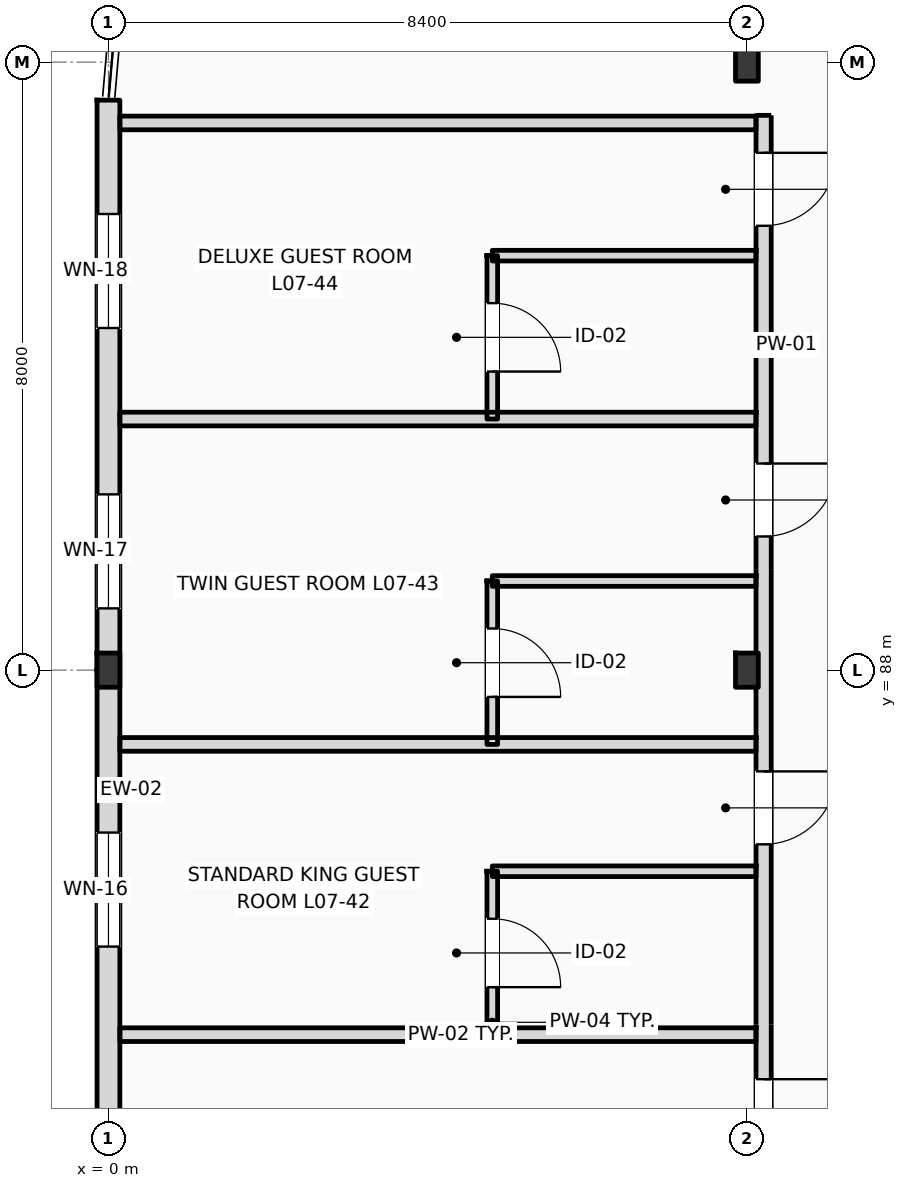
"""IFC4 building model, lengths in metres.
Left out: names, types, materials, properties, quantities, classifications, styles, units other than length and angle.
Written with IfcOpenShell. Run it as: python <this file> out.ifc"""

import sys

from ifc_helpers import new_model, si_unit, direction, frame, frame_2d, origin, origin_2d, place, context, subcontext, project, spatial, rectangle, i_section, extrude, element, fill, save


model = new_model("IFC4")
c1 = context("Model", 3, precision=1e-05, world=origin(), true_north=direction((0.0, 1.0)))
c2 = subcontext(c1, "Body", "Model", "MODEL_VIEW")
j1 = project(units=[si_unit("LENGTHUNIT", "METRE"), si_unit("PLANEANGLEUNIT", "RADIAN")], contexts=[c1])
p1 = place(None, origin())
s1 = spatial("IfcSite", under=j1, at=p1, CompositionType="ELEMENT")
p2 = place(p1, origin())
s2 = spatial("IfcBuilding", under=s1, at=p2, CompositionType="ELEMENT")
p3 = place(p2, frame((0.0, 0.0, 31.8)))
s3 = spatial("IfcBuildingStorey", under=s2, at=p3, CompositionType="ELEMENT", Elevation=31.8)
for number, where, z_axis, x_axis in (
    (1, (0.0, 88.0, 0.0), (0.0, 0.0, 1.0), (1.0, 0.0, 0.0)),
    (2, (8.4, 88.0, 0.0), (0.0, 0.0, 1.0), (1.0, 0.0, 0.0)),
):
    element("IfcColumn", number, at=place(p3, frame(where, z_axis=z_axis, x_axis=x_axis)), inside=s3, PredefinedType="COLUMN", context=c2, shape_type="SweptSolid", body=[
        extrude(i_section(OverallWidth=0.3, OverallDepth=0.45, WebThickness=0.014, FlangeThickness=0.026, FilletRadius=0.027, at=origin_2d()), origin(), (0.0, 0.0, 1.0), 3.6),
    ])
p4 = place(p3, frame((8.4, 96.0, 0.0), z_axis=(0.0, 0.0, 1.0), x_axis=(1.0, 0.0, 0.0)))
e3 = element("IfcColumn", 3, at=p4, inside=s3, PredefinedType="COLUMN", context=c2, shape_type="SweptSolid", body=[
    extrude(i_section(OverallWidth=0.3, OverallDepth=0.5, WebThickness=0.014, FlangeThickness=0.028, FilletRadius=0.027, at=origin_2d()), origin(), (0.0, 0.0, 1.0), 3.6),
])
p5 = place(p3, frame((0.0, 79.5, 0.0), z_axis=(0.0, 0.0, 1.0), x_axis=(0.0, 1.0, 0.0)))
e4 = element("IfcWall", 4, at=p5, inside=s3, PredefinedType="STANDARD", context=c2, shape_type="SweptSolid", body=[
    extrude(rectangle(XDim=8.5, YDim=0.3, at=frame_2d((4.25, 0.0))), origin(), (0.0, 0.0, 1.0), 2.99),
])
p6 = place(p5, frame((0.814, 0.0, 0.9)))
e5 = element("IfcOpeningElement", 5, at=p6, cuts=e4, PredefinedType="OPENING", context=c2, shape_type="SweptSolid", body=[
    extrude(rectangle(XDim=1.5, YDim=1.91, at=frame_2d((0.75, 0.955))), frame((0.0, 0.16, 0.0), z_axis=(0.0, -1.0, 0.0), x_axis=(1.0, 0.0, 0.0)), (0.0, 0.0, 1.0), 0.32),
])
p7 = place(p5, frame((4.863, 0.0, 0.9)))
e6 = element("IfcOpeningElement", 6, at=p7, cuts=e4, PredefinedType="OPENING", context=c2, shape_type="SweptSolid", body=[
    extrude(rectangle(XDim=1.5, YDim=1.91, at=frame_2d((0.75, 0.955))), frame((0.0, 0.16, 0.0), z_axis=(0.0, -1.0, 0.0), x_axis=(1.0, 0.0, 0.0)), (0.0, 0.0, 1.0), 0.32),
])
p8 = place(p3, frame((0.0, 88.0, 0.0), z_axis=(0.0, 0.0, 1.0), x_axis=(0.0, 1.0, 0.0)))
e7 = element("IfcWall", 7, at=p8, inside=s3, PredefinedType="STANDARD", context=c2, shape_type="SweptSolid", body=[
    extrude(rectangle(XDim=7.5, YDim=0.3, at=frame_2d((3.75, 0.0))), origin(), (0.0, 0.0, 1.0), 3.36),
])
p9 = place(p8, frame((0.813, 0.0, 0.9)))
e8 = element("IfcOpeningElement", 8, at=p9, cuts=e7, PredefinedType="OPENING", context=c2, shape_type="SweptSolid", body=[
    extrude(rectangle(XDim=1.5, YDim=2.28, at=frame_2d((0.75, 1.14))), frame((0.0, 0.16, 0.0), z_axis=(0.0, -1.0, 0.0), x_axis=(1.0, 0.0, 0.0)), (0.0, 0.0, 1.0), 0.32),
])
p10 = place(p8, frame((4.502, 0.0, 0.9)))
e9 = element("IfcOpeningElement", 9, at=p10, cuts=e7, PredefinedType="OPENING", context=c2, shape_type="SweptSolid", body=[
    extrude(rectangle(XDim=1.5, YDim=2.28, at=frame_2d((0.75, 1.14))), frame((0.0, 0.16, 0.0), z_axis=(0.0, -1.0, 0.0), x_axis=(1.0, 0.0, 0.0)), (0.0, 0.0, 1.0), 0.32),
])
p11 = place(p3, frame((8.62, 62.64, 0.0), z_axis=(0.0, 0.0, 1.0), x_axis=(0.0, 1.0, 0.0)))
e10 = element("IfcWall", 10, at=p11, inside=s3, PredefinedType="PARTITIONING", context=c2, shape_type="SweptSolid", body=[
    extrude(rectangle(XDim=32.66, YDim=0.2, at=frame_2d((16.33, 0.0))), origin(), (0.0, 0.0, 1.0), 2.99),
])
p12 = place(p11, frame((2.857, 0.0, 0.0)))
e11 = element("IfcOpeningElement", 11, at=p12, cuts=e10, PredefinedType="OPENING", context=c2, shape_type="SweptSolid", body=[
    extrude(rectangle(XDim=0.96, YDim=2.2, at=frame_2d((0.48, 1.1))), frame((0.0, 0.11, 0.0), z_axis=(0.0, -1.0, 0.0), x_axis=(1.0, 0.0, 0.0)), (0.0, 0.0, 1.0), 0.22),
])
p13 = place(p11, frame((4.719, 0.0, 0.0)))
e12 = element("IfcOpeningElement", 12, at=p13, cuts=e10, PredefinedType="OPENING", context=c2, shape_type="SweptSolid", body=[
    extrude(rectangle(XDim=0.96, YDim=2.2, at=frame_2d((0.48, 1.1))), frame((0.0, 0.11, 0.0), z_axis=(0.0, -1.0, 0.0), x_axis=(1.0, 0.0, 0.0)), (0.0, 0.0, 1.0), 0.22),
])
p14 = place(p11, frame((10.918, 0.0, 0.0)))
e13 = element("IfcOpeningElement", 13, at=p14, cuts=e10, PredefinedType="OPENING", context=c2, shape_type="SweptSolid", body=[
    extrude(rectangle(XDim=0.96, YDim=2.2, at=frame_2d((0.48, 1.1))), frame((0.0, 0.11, 0.0), z_axis=(0.0, -1.0, 0.0), x_axis=(1.0, 0.0, 0.0)), (0.0, 0.0, 1.0), 0.22),
])
p15 = place(p11, frame((14.969, 0.0, 0.0)))
e14 = element("IfcOpeningElement", 14, at=p15, cuts=e10, PredefinedType="OPENING", context=c2, shape_type="SweptSolid", body=[
    extrude(rectangle(XDim=0.96, YDim=2.2, at=frame_2d((0.48, 1.1))), frame((0.0, 0.11, 0.0), z_axis=(0.0, -1.0, 0.0), x_axis=(1.0, 0.0, 0.0)), (0.0, 0.0, 1.0), 0.22),
])
p16 = place(p11, frame((19.018, 0.0, 0.0)))
e15 = element("IfcOpeningElement", 15, at=p16, cuts=e10, PredefinedType="OPENING", context=c2, shape_type="SweptSolid", body=[
    extrude(rectangle(XDim=0.96, YDim=2.2, at=frame_2d((0.48, 1.1))), frame((0.0, 0.11, 0.0), z_axis=(0.0, -1.0, 0.0), x_axis=(1.0, 0.0, 0.0)), (0.0, 0.0, 1.0), 0.22),
])
p17 = place(p11, frame((23.068, 0.0, 0.0)))
e16 = element("IfcOpeningElement", 16, at=p17, cuts=e10, PredefinedType="OPENING", context=c2, shape_type="SweptSolid", body=[
    extrude(rectangle(XDim=0.96, YDim=2.2, at=frame_2d((0.48, 1.1))), frame((0.0, 0.11, 0.0), z_axis=(0.0, -1.0, 0.0), x_axis=(1.0, 0.0, 0.0)), (0.0, 0.0, 1.0), 0.22),
])
p18 = place(p11, frame((27.119, 0.0, 0.0)))
e17 = element("IfcOpeningElement", 17, at=p18, cuts=e10, PredefinedType="OPENING", context=c2, shape_type="SweptSolid", body=[
    extrude(rectangle(XDim=0.96, YDim=2.2, at=frame_2d((0.48, 1.1))), frame((0.0, 0.11, 0.0), z_axis=(0.0, -1.0, 0.0), x_axis=(1.0, 0.0, 0.0)), (0.0, 0.0, 1.0), 0.22),
])
p19 = place(p11, frame((31.207, 0.0, 0.0)))
e18 = element("IfcOpeningElement", 18, at=p19, cuts=e10, PredefinedType="OPENING", context=c2, shape_type="SweptSolid", body=[
    extrude(rectangle(XDim=0.96, YDim=2.2, at=frame_2d((0.48, 1.1))), frame((0.0, 0.11, 0.0), z_axis=(0.0, -1.0, 0.0), x_axis=(1.0, 0.0, 0.0)), (0.0, 0.0, 1.0), 0.22),
])
for number, where, z_axis, x_axis in (
    (19, (0.15, 83.204, 0.0), (0.0, 0.0, 1.0), (1.0, 0.0, 0.0)),
    (20, (0.15, 87.023, 0.0), (0.0, 0.0, 1.0), (1.0, 0.0, 0.0)),
):
    element("IfcWall", number, at=place(p3, frame(where, z_axis=z_axis, x_axis=x_axis)), inside=s3, PredefinedType="PARTITIONING", context=c2, shape_type="SweptSolid", body=[
        extrude(rectangle(XDim=8.37, YDim=0.18, at=frame_2d((4.185, 0.0))), origin(), (0.0, 0.0, 1.0), 3.36),
    ])
p20 = place(p3, frame((5.05, 85.354, 0.0), z_axis=(0.0, 0.0, 1.0), x_axis=(1.0, 0.0, 0.0)))
e21 = element("IfcWall", 21, at=p20, inside=s3, PredefinedType="PARTITIONING", context=c2, shape_type="SweptSolid", body=[
    extrude(rectangle(XDim=3.47, YDim=0.14, at=frame_2d((1.735, 0.0))), origin(), (0.0, 0.0, 1.0), 3.36),
])
p21 = place(p3, frame((5.05, 83.204, 0.0), z_axis=(0.0, 0.0, 1.0), x_axis=(0.0, 1.0, 0.0)))
e22 = element("IfcWall", 22, at=p21, inside=s3, PredefinedType="PARTITIONING", context=c2, shape_type="SweptSolid", body=[
    extrude(rectangle(XDim=2.15, YDim=0.14, at=frame_2d((1.075, 0.0))), origin(), (0.0, 0.0, 1.0), 3.36),
])
p22 = place(p21, frame((0.625, 0.0, 0.0)))
e23 = element("IfcOpeningElement", 23, at=p22, cuts=e22, PredefinedType="OPENING", context=c2, shape_type="SweptSolid", body=[
    extrude(rectangle(XDim=0.9, YDim=2.1, at=frame_2d((0.45, 1.05))), frame((0.0, 0.08, 0.0), z_axis=(0.0, -1.0, 0.0), x_axis=(1.0, 0.0, 0.0)), (0.0, 0.0, 1.0), 0.16),
])
p23 = place(p3, frame((0.15, 91.304, 0.0), z_axis=(0.0, 0.0, 1.0), x_axis=(1.0, 0.0, 0.0)))
e24 = element("IfcWall", 24, at=p23, inside=s3, PredefinedType="PARTITIONING", context=c2, shape_type="SweptSolid", body=[
    extrude(rectangle(XDim=8.37, YDim=0.18, at=frame_2d((4.185, 0.0))), origin(), (0.0, 0.0, 1.0), 3.36),
])
p24 = place(p3, frame((5.05, 89.173, 0.0), z_axis=(0.0, 0.0, 1.0), x_axis=(1.0, 0.0, 0.0)))
e25 = element("IfcWall", 25, at=p24, inside=s3, PredefinedType="PARTITIONING", context=c2, shape_type="SweptSolid", body=[
    extrude(rectangle(XDim=3.47, YDim=0.14, at=frame_2d((1.735, 0.0))), origin(), (0.0, 0.0, 1.0), 3.36),
])
p25 = place(p3, frame((5.05, 87.023, 0.0), z_axis=(0.0, 0.0, 1.0), x_axis=(0.0, 1.0, 0.0)))
e26 = element("IfcWall", 26, at=p25, inside=s3, PredefinedType="PARTITIONING", context=c2, shape_type="SweptSolid", body=[
    extrude(rectangle(XDim=2.15, YDim=0.14, at=frame_2d((1.075, 0.0))), origin(), (0.0, 0.0, 1.0), 3.36),
])
p26 = place(p25, frame((0.625, 0.0, 0.0)))
e27 = element("IfcOpeningElement", 27, at=p26, cuts=e26, PredefinedType="OPENING", context=c2, shape_type="SweptSolid", body=[
    extrude(rectangle(XDim=0.9, YDim=2.1, at=frame_2d((0.45, 1.05))), frame((0.0, 0.08, 0.0), z_axis=(0.0, -1.0, 0.0), x_axis=(1.0, 0.0, 0.0)), (0.0, 0.0, 1.0), 0.16),
])
p27 = place(p3, frame((0.15, 95.2, 0.0), z_axis=(0.0, 0.0, 1.0), x_axis=(1.0, 0.0, 0.0)))
e28 = element("IfcWall", 28, at=p27, inside=s3, PredefinedType="PARTITIONING", context=c2, shape_type="SweptSolid", body=[
    extrude(rectangle(XDim=8.37, YDim=0.18, at=frame_2d((4.185, 0.0))), origin(), (0.0, 0.0, 1.0), 3.36),
])
p28 = place(p3, frame((5.05, 93.454, 0.0), z_axis=(0.0, 0.0, 1.0), x_axis=(1.0, 0.0, 0.0)))
e29 = element("IfcWall", 29, at=p28, inside=s3, PredefinedType="PARTITIONING", context=c2, shape_type="SweptSolid", body=[
    extrude(rectangle(XDim=3.47, YDim=0.14, at=frame_2d((1.735, 0.0))), origin(), (0.0, 0.0, 1.0), 3.36),
])
p29 = place(p3, frame((5.05, 91.304, 0.0), z_axis=(0.0, 0.0, 1.0), x_axis=(0.0, 1.0, 0.0)))
e30 = element("IfcWall", 30, at=p29, inside=s3, PredefinedType="PARTITIONING", context=c2, shape_type="SweptSolid", body=[
    extrude(rectangle(XDim=2.15, YDim=0.14, at=frame_2d((1.075, 0.0))), origin(), (0.0, 0.0, 1.0), 3.36),
])
p30 = place(p29, frame((0.625, 0.0, 0.0)))
e31 = element("IfcOpeningElement", 31, at=p30, cuts=e30, PredefinedType="OPENING", context=c2, shape_type="SweptSolid", body=[
    extrude(rectangle(XDim=0.9, YDim=2.1, at=frame_2d((0.45, 1.05))), frame((0.0, 0.08, 0.0), z_axis=(0.0, -1.0, 0.0), x_axis=(1.0, 0.0, 0.0)), (0.0, 0.0, 1.0), 0.16),
])
p31 = place(p7, origin())
e32 = element("IfcWindow", 32, at=p31, inside=s3, PartitioningType="DOUBLE_PANEL_VERTICAL", PredefinedType="WINDOW", context=c2, shape_type="SweptSolid", body=[
    extrude(rectangle(XDim=1.5, YDim=1.91, at=frame_2d((0.75, 0.955))), frame((0.0, 0.03, 0.0), z_axis=(0.0, -1.0, 0.0), x_axis=(1.0, 0.0, 0.0)), (0.0, 0.0, 1.0), 0.06),
])
fill(e6, e32)
p32 = place(p9, origin())
e33 = element("IfcWindow", 33, at=p32, inside=s3, PartitioningType="DOUBLE_PANEL_VERTICAL", PredefinedType="WINDOW", context=c2, shape_type="SweptSolid", body=[
    extrude(rectangle(XDim=1.5, YDim=2.28, at=frame_2d((0.75, 1.14))), frame((0.0, 0.03, 0.0), z_axis=(0.0, -1.0, 0.0), x_axis=(1.0, 0.0, 0.0)), (0.0, 0.0, 1.0), 0.06),
])
fill(e8, e33)
p33 = place(p10, origin())
e34 = element("IfcWindow", 34, at=p33, inside=s3, PartitioningType="DOUBLE_PANEL_VERTICAL", PredefinedType="WINDOW", context=c2, shape_type="SweptSolid", body=[
    extrude(rectangle(XDim=1.5, YDim=2.28, at=frame_2d((0.75, 1.14))), frame((0.0, 0.03, 0.0), z_axis=(0.0, -1.0, 0.0), x_axis=(1.0, 0.0, 0.0)), (0.0, 0.0, 1.0), 0.06),
])
fill(e9, e34)
p34 = place(p16, frame((0.96, 0.0, 0.0), z_axis=(0.0, 0.0, 1.0), x_axis=(-1.0, 0.0, 0.0)))
e35 = element("IfcDoor", 35, at=p34, inside=s3, OperationType="SINGLE_SWING_RIGHT", PredefinedType="DOOR", context=c2, shape_type="SweptSolid", body=[
    extrude(rectangle(XDim=0.96, YDim=2.2, at=frame_2d((0.48, 1.1))), frame((0.0, 0.025, 0.0), z_axis=(0.0, -1.0, 0.0), x_axis=(1.0, 0.0, 0.0)), (0.0, 0.0, 1.0), 0.05),
])
fill(e15, e35)
p35 = place(p17, frame((0.96, 0.0, 0.0), z_axis=(0.0, 0.0, 1.0), x_axis=(-1.0, 0.0, 0.0)))
e36 = element("IfcDoor", 36, at=p35, inside=s3, OperationType="SINGLE_SWING_RIGHT", PredefinedType="DOOR", context=c2, shape_type="SweptSolid", body=[
    extrude(rectangle(XDim=0.96, YDim=2.2, at=frame_2d((0.48, 1.1))), frame((0.0, 0.025, 0.0), z_axis=(0.0, -1.0, 0.0), x_axis=(1.0, 0.0, 0.0)), (0.0, 0.0, 1.0), 0.05),
])
fill(e16, e36)
p36 = place(p22, frame((0.9, 0.0, 0.0), z_axis=(0.0, 0.0, 1.0), x_axis=(-1.0, 0.0, 0.0)))
e37 = element("IfcDoor", 37, at=p36, inside=s3, OperationType="SINGLE_SWING_LEFT", PredefinedType="DOOR", context=c2, shape_type="SweptSolid", body=[
    extrude(rectangle(XDim=0.9, YDim=2.1, at=frame_2d((0.45, 1.05))), frame((0.0, 0.025, 0.0), z_axis=(0.0, -1.0, 0.0), x_axis=(1.0, 0.0, 0.0)), (0.0, 0.0, 1.0), 0.05),
])
fill(e23, e37)
p37 = place(p18, frame((0.96, 0.0, 0.0), z_axis=(0.0, 0.0, 1.0), x_axis=(-1.0, 0.0, 0.0)))
e38 = element("IfcDoor", 38, at=p37, inside=s3, OperationType="SINGLE_SWING_RIGHT", PredefinedType="DOOR", context=c2, shape_type="SweptSolid", body=[
    extrude(rectangle(XDim=0.96, YDim=2.2, at=frame_2d((0.48, 1.1))), frame((0.0, 0.025, 0.0), z_axis=(0.0, -1.0, 0.0), x_axis=(1.0, 0.0, 0.0)), (0.0, 0.0, 1.0), 0.05),
])
fill(e17, e38)
p38 = place(p26, frame((0.9, 0.0, 0.0), z_axis=(0.0, 0.0, 1.0), x_axis=(-1.0, 0.0, 0.0)))
e39 = element("IfcDoor", 39, at=p38, inside=s3, OperationType="SINGLE_SWING_LEFT", PredefinedType="DOOR", context=c2, shape_type="SweptSolid", body=[
    extrude(rectangle(XDim=0.9, YDim=2.1, at=frame_2d((0.45, 1.05))), frame((0.0, 0.025, 0.0), z_axis=(0.0, -1.0, 0.0), x_axis=(1.0, 0.0, 0.0)), (0.0, 0.0, 1.0), 0.05),
])
fill(e27, e39)
p39 = place(p19, frame((0.96, 0.0, 0.0), z_axis=(0.0, 0.0, 1.0), x_axis=(-1.0, 0.0, 0.0)))
e40 = element("IfcDoor", 40, at=p39, inside=s3, OperationType="SINGLE_SWING_RIGHT", PredefinedType="DOOR", context=c2, shape_type="SweptSolid", body=[
    extrude(rectangle(XDim=0.96, YDim=2.2, at=frame_2d((0.48, 1.1))), frame((0.0, 0.025, 0.0), z_axis=(0.0, -1.0, 0.0), x_axis=(1.0, 0.0, 0.0)), (0.0, 0.0, 1.0), 0.05),
])
fill(e18, e40)
p40 = place(p30, frame((0.9, 0.0, 0.0), z_axis=(0.0, 0.0, 1.0), x_axis=(-1.0, 0.0, 0.0)))
e41 = element("IfcDoor", 41, at=p40, inside=s3, OperationType="SINGLE_SWING_LEFT", PredefinedType="DOOR", context=c2, shape_type="SweptSolid", body=[
    extrude(rectangle(XDim=0.9, YDim=2.1, at=frame_2d((0.45, 1.05))), frame((0.0, 0.025, 0.0), z_axis=(0.0, -1.0, 0.0), x_axis=(1.0, 0.0, 0.0)), (0.0, 0.0, 1.0), 0.05),
])
fill(e31, e41)
save(model, sys.argv[1])
